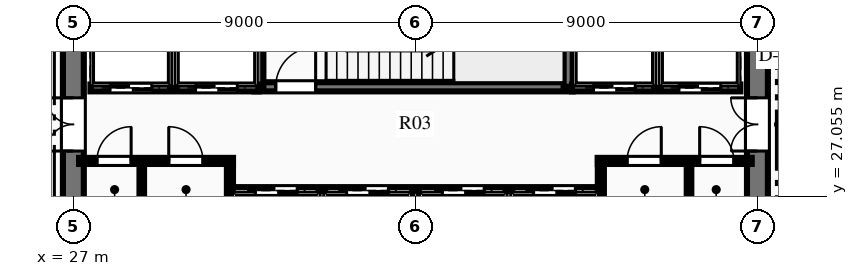
"""IFC4 building model, lengths in metres.
Left out: names, types, materials, properties, quantities, classifications, styles, units other than length and angle.
Written with IfcOpenShell. Run it as: python <this file> out.ifc"""

import sys

from ifc_helpers import new_model, si_unit, direction, frame, frame_2d, origin, place, context, subcontext, project, spatial, rectangle, extrude, element, fill, save


model = new_model("IFC4")
c1 = context("Model", 3, precision=1e-05, world=origin(), true_north=direction((0.0, 1.0)))
c2 = subcontext(c1, "Body", "Model", "MODEL_VIEW")
j1 = project(units=[si_unit("LENGTHUNIT", "METRE"), si_unit("PLANEANGLEUNIT", "RADIAN")], contexts=[c1])
p1 = place(None, origin())
s1 = spatial("IfcSite", under=j1, at=p1, CompositionType="ELEMENT")
p2 = place(p1, origin())
s2 = spatial("IfcBuilding", under=s1, at=p2, CompositionType="ELEMENT")
p3 = place(p2, frame((0.0, 0.0, 131.7)))
s3 = spatial("IfcBuildingStorey", under=s2, at=p3, CompositionType="ELEMENT", Elevation=131.7)
p4 = place(p3, frame((27.0, 18.275, 0.0), z_axis=(0.0, 0.0, 1.0), x_axis=(0.0, 1.0, 0.0)))
e1 = element("IfcWall", 1, at=p4, inside=s3, PredefinedType="SHEAR", context=c2, shape_type="SweptSolid", body=[
    extrude(rectangle(XDim=15.45, YDim=0.55, at=frame_2d((7.725, 0.0))), origin(), (0.0, 0.0, 1.0), 4.5),
])
p5 = place(p4, frame((9.965, 0.0, 0.0)))
e2 = element("IfcOpeningElement", 2, at=p5, cuts=e1, PredefinedType="OPENING", context=c2, shape_type="SweptSolid", body=[
    extrude(rectangle(XDim=1.4, YDim=2.2, at=frame_2d((0.7, 1.1))), frame((0.0, 0.285, 0.0), z_axis=(0.0, -1.0, 0.0), x_axis=(1.0, 0.0, 0.0)), (0.0, 0.0, 1.0), 0.57),
])
p6 = place(p3, frame((45.0, 18.275, 0.0), z_axis=(0.0, 0.0, 1.0), x_axis=(0.0, 1.0, 0.0)))
e3 = element("IfcWall", 3, at=p6, inside=s3, PredefinedType="SHEAR", context=c2, shape_type="SweptSolid", body=[
    extrude(rectangle(XDim=15.45, YDim=0.55, at=frame_2d((7.725, 0.0))), origin(), (0.0, 0.0, 1.0), 4.5),
])
p7 = place(p6, frame((9.965, 0.0, 0.0)))
e4 = element("IfcOpeningElement", 4, at=p7, cuts=e3, PredefinedType="OPENING", context=c2, shape_type="SweptSolid", body=[
    extrude(rectangle(XDim=1.4, YDim=2.2, at=frame_2d((0.7, 1.1))), frame((0.0, 0.285, 0.0), z_axis=(0.0, -1.0, 0.0), x_axis=(1.0, 0.0, 0.0)), (0.0, 0.0, 1.0), 0.57),
])
p8 = place(p3, frame((31.76, 29.93, 0.0), z_axis=(0.0, 0.0, 1.0), x_axis=(1.0, 0.0, 0.0)))
e5 = element("IfcWall", 5, at=p8, inside=s3, PredefinedType="SHEAR", context=c2, shape_type="SweptSolid", body=[
    extrude(rectangle(XDim=8.38, YDim=0.24, at=frame_2d((4.19, 0.0))), origin(), (0.0, 0.0, 1.0), 4.5),
])
p9 = place(p8, frame((0.565, 0.0, 0.0)))
e6 = element("IfcOpeningElement", 6, at=p9, cuts=e5, PredefinedType="OPENING", context=c2, shape_type="SweptSolid", body=[
    extrude(rectangle(XDim=1.05, YDim=2.15, at=frame_2d((0.525, 1.075))), frame((0.0, 0.13, 0.0), z_axis=(0.0, -1.0, 0.0), x_axis=(1.0, 0.0, 0.0)), (0.0, 0.0, 1.0), 0.26),
])
p10 = place(p3, frame((31.88, 29.93, 0.0), z_axis=(0.0, 0.0, 1.0), x_axis=(0.0, 1.0, 0.0)))
e7 = element("IfcWall", 7, at=p10, inside=s3, PredefinedType="SHEAR", context=c2, shape_type="SweptSolid", body=[
    extrude(rectangle(XDim=3.79, YDim=0.24, at=frame_2d((1.895, 0.0))), origin(), (0.0, 0.0, 1.0), 4.5),
])
p11 = place(p3, frame((40.02, 29.93, 0.0), z_axis=(0.0, 0.0, 1.0), x_axis=(0.0, 1.0, 0.0)))
e8 = element("IfcWall", 8, at=p11, inside=s3, PredefinedType="SHEAR", context=c2, shape_type="SweptSolid", body=[
    extrude(rectangle(XDim=3.85, YDim=0.24, at=frame_2d((1.925, 0.0))), origin(), (0.0, 0.0, 1.0), 4.5),
])
p12 = place(p3, frame((27.15, 27.98, 0.0), z_axis=(0.0, 0.0, 1.0), x_axis=(1.0, 0.0, 0.0)))
e9 = element("IfcWall", 9, at=p12, inside=s3, PredefinedType="PARTITIONING", context=c2, shape_type="SweptSolid", body=[
    extrude(rectangle(XDim=4.05, YDim=0.16, at=frame_2d((2.025, 0.0))), origin(), (0.0, 0.0, 1.0), 4.1),
])
p13 = place(p12, frame((0.47, 0.0, 0.0)))
e10 = element("IfcOpeningElement", 10, at=p13, cuts=e9, PredefinedType="OPENING", context=c2, shape_type="SweptSolid", body=[
    extrude(rectangle(XDim=0.9, YDim=2.15, at=frame_2d((0.45, 1.075))), frame((0.0, 0.09, 0.0), z_axis=(0.0, -1.0, 0.0), x_axis=(1.0, 0.0, 0.0)), (0.0, 0.0, 1.0), 0.18),
])
p14 = place(p12, frame((2.36, 0.0, 0.0)))
e11 = element("IfcOpeningElement", 11, at=p14, cuts=e9, PredefinedType="OPENING", context=c2, shape_type="SweptSolid", body=[
    extrude(rectangle(XDim=0.9, YDim=2.15, at=frame_2d((0.45, 1.075))), frame((0.0, 0.09, 0.0), z_axis=(0.0, -1.0, 0.0), x_axis=(1.0, 0.0, 0.0)), (0.0, 0.0, 1.0), 0.18),
])
p15 = place(p3, frame((31.12, 26.54, 0.0), z_axis=(0.0, 0.0, 1.0), x_axis=(0.0, 1.0, 0.0)))
e12 = element("IfcWall", 12, at=p15, inside=s3, PredefinedType="PARTITIONING", context=c2, shape_type="SweptSolid", body=[
    extrude(rectangle(XDim=1.51, YDim=0.16, at=frame_2d((0.755, 0.0))), origin(), (0.0, 0.0, 1.0), 4.1),
])
p16 = place(p3, frame((40.8, 27.98, 0.0), z_axis=(0.0, 0.0, 1.0), x_axis=(1.0, 0.0, 0.0)))
e13 = element("IfcWall", 13, at=p16, inside=s3, PredefinedType="PARTITIONING", context=c2, shape_type="SweptSolid", body=[
    extrude(rectangle(XDim=4.05, YDim=0.16, at=frame_2d((2.025, 0.0))), origin(), (0.0, 0.0, 1.0), 4.1),
])
p17 = place(p16, frame((0.77, 0.0, 0.0)))
e14 = element("IfcOpeningElement", 14, at=p17, cuts=e13, PredefinedType="OPENING", context=c2, shape_type="SweptSolid", body=[
    extrude(rectangle(XDim=0.9, YDim=2.15, at=frame_2d((0.45, 1.075))), frame((0.0, 0.09, 0.0), z_axis=(0.0, -1.0, 0.0), x_axis=(1.0, 0.0, 0.0)), (0.0, 0.0, 1.0), 0.18),
])
p18 = place(p16, frame((2.68, 0.0, 0.0)))
e15 = element("IfcOpeningElement", 15, at=p18, cuts=e13, PredefinedType="OPENING", context=c2, shape_type="SweptSolid", body=[
    extrude(rectangle(XDim=0.9, YDim=2.15, at=frame_2d((0.45, 1.075))), frame((0.0, 0.09, 0.0), z_axis=(0.0, -1.0, 0.0), x_axis=(1.0, 0.0, 0.0)), (0.0, 0.0, 1.0), 0.18),
])
p19 = place(p3, frame((40.88, 26.54, 0.0), z_axis=(0.0, 0.0, 1.0), x_axis=(0.0, 1.0, 0.0)))
e16 = element("IfcWall", 16, at=p19, inside=s3, PredefinedType="PARTITIONING", context=c2, shape_type="SweptSolid", body=[
    extrude(rectangle(XDim=1.51, YDim=0.16, at=frame_2d((0.755, 0.0))), origin(), (0.0, 0.0, 1.0), 4.1),
])
for number, where, z_axis, x_axis in (
    (17, (28.8, 26.54, 0.0), (0.0, 0.0, 1.0), (0.0, 1.0, 0.0)),
    (18, (43.2, 26.54, 0.0), (0.0, 0.0, 1.0), (0.0, 1.0, 0.0)),
):
    element("IfcWall", number, at=place(p3, frame(where, z_axis=z_axis, x_axis=x_axis)), inside=s3, PredefinedType="PARTITIONING", context=c2, shape_type="SweptSolid", body=[
        extrude(rectangle(XDim=1.44, YDim=0.12, at=frame_2d((0.72, 0.0))), origin(), (0.0, 0.0, 1.0), 4.1),
    ])
p20 = place(p3, frame((27.45, 29.9, 0.0), z_axis=(0.0, 0.0, 1.0), x_axis=(1.0, 0.0, 0.0)))
e19 = element("IfcWall", 19, at=p20, inside=s3, PredefinedType="PARTITIONING", context=c2, shape_type="SweptSolid", body=[
    extrude(rectangle(XDim=4.43, YDim=0.18, at=frame_2d((2.215, 0.0))), origin(), (0.0, 0.0, 1.0), 4.1),
])
p21 = place(p20, frame((0.515, 0.0, 0.0)))
e20 = element("IfcOpeningElement", 20, at=p21, cuts=e19, PredefinedType="OPENING", context=c2, shape_type="SweptSolid", body=[
    extrude(rectangle(XDim=1.1, YDim=2.15, at=frame_2d((0.55, 1.075))), frame((0.0, 0.1, 0.0), z_axis=(0.0, -1.0, 0.0), x_axis=(1.0, 0.0, 0.0)), (0.0, 0.0, 1.0), 0.2),
])
p22 = place(p20, frame((2.765, 0.0, 0.0)))
e21 = element("IfcOpeningElement", 21, at=p22, cuts=e19, PredefinedType="OPENING", context=c2, shape_type="SweptSolid", body=[
    extrude(rectangle(XDim=1.1, YDim=2.15, at=frame_2d((0.55, 1.075))), frame((0.0, 0.1, 0.0), z_axis=(0.0, -1.0, 0.0), x_axis=(1.0, 0.0, 0.0)), (0.0, 0.0, 1.0), 0.2),
])
p23 = place(p3, frame((29.63, 29.9, 0.0), z_axis=(0.0, 0.0, 1.0), x_axis=(0.0, 1.0, 0.0)))
e22 = element("IfcWall", 22, at=p23, inside=s3, PredefinedType="PARTITIONING", context=c2, shape_type="SweptSolid", body=[
    extrude(rectangle(XDim=3.75, YDim=0.18, at=frame_2d((1.875, 0.0))), origin(), (0.0, 0.0, 1.0), 4.1),
])
p24 = place(p3, frame((40.12, 29.9, 0.0), z_axis=(0.0, 0.0, 1.0), x_axis=(1.0, 0.0, 0.0)))
e23 = element("IfcWall", 23, at=p24, inside=s3, PredefinedType="PARTITIONING", context=c2, shape_type="SweptSolid", body=[
    extrude(rectangle(XDim=4.43, YDim=0.18, at=frame_2d((2.215, 0.0))), origin(), (0.0, 0.0, 1.0), 4.1),
])
p25 = place(p24, frame((0.565, 0.0, 0.0)))
e24 = element("IfcOpeningElement", 24, at=p25, cuts=e23, PredefinedType="OPENING", context=c2, shape_type="SweptSolid", body=[
    extrude(rectangle(XDim=1.1, YDim=2.15, at=frame_2d((0.55, 1.075))), frame((0.0, 0.1, 0.0), z_axis=(0.0, -1.0, 0.0), x_axis=(1.0, 0.0, 0.0)), (0.0, 0.0, 1.0), 0.2),
])
p26 = place(p24, frame((2.815, 0.0, 0.0)))
e25 = element("IfcOpeningElement", 25, at=p26, cuts=e23, PredefinedType="OPENING", context=c2, shape_type="SweptSolid", body=[
    extrude(rectangle(XDim=1.1, YDim=2.15, at=frame_2d((0.55, 1.075))), frame((0.0, 0.1, 0.0), z_axis=(0.0, -1.0, 0.0), x_axis=(1.0, 0.0, 0.0)), (0.0, 0.0, 1.0), 0.2),
])
p27 = place(p3, frame((42.37, 29.9, 0.0), z_axis=(0.0, 0.0, 1.0), x_axis=(0.0, 1.0, 0.0)))
e26 = element("IfcWall", 26, at=p27, inside=s3, PredefinedType="PARTITIONING", context=c2, shape_type="SweptSolid", body=[
    extrude(rectangle(XDim=3.75, YDim=0.18, at=frame_2d((1.875, 0.0))), origin(), (0.0, 0.0, 1.0), 4.1),
])
p28 = place(p3, frame((31.2, 27.2, 0.0), z_axis=(0.0, 0.0, 1.0), x_axis=(1.0, 0.0, 0.0)))
e27 = element("IfcWall", 27, at=p28, inside=s3, PredefinedType="PARTITIONING", context=c2, shape_type="SweptSolid", body=[
    extrude(rectangle(XDim=9.6, YDim=0.18, at=frame_2d((4.8, 0.0))), origin(), (0.0, 0.0, 1.0), 4.1),
])
p29 = place(p28, frame((0.59, 0.0, 0.0)))
e28 = element("IfcOpeningElement", 28, at=p29, cuts=e27, PredefinedType="OPENING", context=c2, shape_type="SweptSolid", body=[
    extrude(rectangle(XDim=1.1, YDim=2.15, at=frame_2d((0.55, 1.075))), frame((0.0, 0.1, 0.0), z_axis=(0.0, -1.0, 0.0), x_axis=(1.0, 0.0, 0.0)), (0.0, 0.0, 1.0), 0.2),
])
p30 = place(p28, frame((2.99, 0.0, 0.0)))
e29 = element("IfcOpeningElement", 29, at=p30, cuts=e27, PredefinedType="OPENING", context=c2, shape_type="SweptSolid", body=[
    extrude(rectangle(XDim=1.1, YDim=2.15, at=frame_2d((0.55, 1.075))), frame((0.0, 0.1, 0.0), z_axis=(0.0, -1.0, 0.0), x_axis=(1.0, 0.0, 0.0)), (0.0, 0.0, 1.0), 0.2),
])
p31 = place(p28, frame((5.51, 0.0, 0.0)))
e30 = element("IfcOpeningElement", 30, at=p31, cuts=e27, PredefinedType="OPENING", context=c2, shape_type="SweptSolid", body=[
    extrude(rectangle(XDim=1.1, YDim=2.15, at=frame_2d((0.55, 1.075))), frame((0.0, 0.1, 0.0), z_axis=(0.0, -1.0, 0.0), x_axis=(1.0, 0.0, 0.0)), (0.0, 0.0, 1.0), 0.2),
])
p32 = place(p28, frame((7.91, 0.0, 0.0)))
e31 = element("IfcOpeningElement", 31, at=p32, cuts=e27, PredefinedType="OPENING", context=c2, shape_type="SweptSolid", body=[
    extrude(rectangle(XDim=1.1, YDim=2.15, at=frame_2d((0.55, 1.075))), frame((0.0, 0.1, 0.0), z_axis=(0.0, -1.0, 0.0), x_axis=(1.0, 0.0, 0.0)), (0.0, 0.0, 1.0), 0.2),
])
for number, where, z_axis, x_axis in (
    (32, (33.54, 25.3, 0.0), (0.0, 0.0, 1.0), (0.0, 1.0, 0.0)),
    (33, (36.0, 25.3, 0.0), (0.0, 0.0, 1.0), (0.0, 1.0, 0.0)),
    (34, (38.46, 25.3, 0.0), (0.0, 0.0, 1.0), (0.0, 1.0, 0.0)),
):
    element("IfcWall", number, at=place(p3, frame(where, z_axis=z_axis, x_axis=x_axis)), inside=s3, PredefinedType="PARTITIONING", context=c2, shape_type="SweptSolid", body=[
        extrude(rectangle(XDim=1.9, YDim=0.18, at=frame_2d((0.95, 0.0))), origin(), (0.0, 0.0, 1.0), 4.1),
    ])
p33 = place(p13, origin())
e35 = element("IfcDoor", 35, at=p33, inside=s3, OperationType="SINGLE_SWING_RIGHT", PredefinedType="DOOR", context=c2, shape_type="SweptSolid", body=[
    extrude(rectangle(XDim=0.9, YDim=2.15, at=frame_2d((0.45, 1.075))), frame((0.0, 0.025, 0.0), z_axis=(0.0, -1.0, 0.0), x_axis=(1.0, 0.0, 0.0)), (0.0, 0.0, 1.0), 0.05),
])
fill(e10, e35)
p34 = place(p14, origin())
e36 = element("IfcDoor", 36, at=p34, inside=s3, OperationType="SINGLE_SWING_LEFT", PredefinedType="DOOR", context=c2, shape_type="SweptSolid", body=[
    extrude(rectangle(XDim=0.9, YDim=2.15, at=frame_2d((0.45, 1.075))), frame((0.0, 0.025, 0.0), z_axis=(0.0, -1.0, 0.0), x_axis=(1.0, 0.0, 0.0)), (0.0, 0.0, 1.0), 0.05),
])
fill(e11, e36)
p35 = place(p17, origin())
e37 = element("IfcDoor", 37, at=p35, inside=s3, OperationType="SINGLE_SWING_RIGHT", PredefinedType="DOOR", context=c2, shape_type="SweptSolid", body=[
    extrude(rectangle(XDim=0.9, YDim=2.15, at=frame_2d((0.45, 1.075))), frame((0.0, 0.025, 0.0), z_axis=(0.0, -1.0, 0.0), x_axis=(1.0, 0.0, 0.0)), (0.0, 0.0, 1.0), 0.05),
])
fill(e14, e37)
p36 = place(p18, origin())
e38 = element("IfcDoor", 38, at=p36, inside=s3, OperationType="SINGLE_SWING_LEFT", PredefinedType="DOOR", context=c2, shape_type="SweptSolid", body=[
    extrude(rectangle(XDim=0.9, YDim=2.15, at=frame_2d((0.45, 1.075))), frame((0.0, 0.025, 0.0), z_axis=(0.0, -1.0, 0.0), x_axis=(1.0, 0.0, 0.0)), (0.0, 0.0, 1.0), 0.05),
])
fill(e15, e38)
p37 = place(p9, origin())
e39 = element("IfcDoor", 39, at=p37, inside=s3, OperationType="SINGLE_SWING_RIGHT", PredefinedType="DOOR", context=c2, shape_type="SweptSolid", body=[
    extrude(rectangle(XDim=1.05, YDim=2.15, at=frame_2d((0.525, 1.075))), frame((0.0, 0.025, 0.0), z_axis=(0.0, -1.0, 0.0), x_axis=(1.0, 0.0, 0.0)), (0.0, 0.0, 1.0), 0.05),
])
fill(e6, e39)
p38 = place(p5, origin())
e40 = element("IfcDoor", 40, at=p38, inside=s3, OperationType="DOUBLE_DOOR_SINGLE_SWING", PredefinedType="DOOR", context=c2, shape_type="SweptSolid", body=[
    extrude(rectangle(XDim=1.4, YDim=2.2, at=frame_2d((0.7, 1.1))), frame((0.0, 0.025, 0.0), z_axis=(0.0, -1.0, 0.0), x_axis=(1.0, 0.0, 0.0)), (0.0, 0.0, 1.0), 0.05),
])
fill(e2, e40)
p39 = place(p7, origin())
e41 = element("IfcDoor", 41, at=p39, inside=s3, OperationType="DOUBLE_DOOR_SINGLE_SWING", PredefinedType="DOOR", context=c2, shape_type="SweptSolid", body=[
    extrude(rectangle(XDim=1.4, YDim=2.2, at=frame_2d((0.7, 1.1))), frame((0.0, 0.025, 0.0), z_axis=(0.0, -1.0, 0.0), x_axis=(1.0, 0.0, 0.0)), (0.0, 0.0, 1.0), 0.05),
])
fill(e4, e41)
p40 = place(p21, origin())
e42 = element("IfcDoor", 42, at=p40, inside=s3, OperationType="SLIDING_TO_LEFT", PredefinedType="DOOR", context=c2, shape_type="SweptSolid", body=[
    extrude(rectangle(XDim=1.1, YDim=2.15, at=frame_2d((0.55, 1.075))), frame((0.0, 0.025, 0.0), z_axis=(0.0, -1.0, 0.0), x_axis=(1.0, 0.0, 0.0)), (0.0, 0.0, 1.0), 0.05),
])
fill(e20, e42)
p41 = place(p22, origin())
e43 = element("IfcDoor", 43, at=p41, inside=s3, OperationType="SLIDING_TO_LEFT", PredefinedType="DOOR", context=c2, shape_type="SweptSolid", body=[
    extrude(rectangle(XDim=1.1, YDim=2.15, at=frame_2d((0.55, 1.075))), frame((0.0, 0.025, 0.0), z_axis=(0.0, -1.0, 0.0), x_axis=(1.0, 0.0, 0.0)), (0.0, 0.0, 1.0), 0.05),
])
fill(e21, e43)
p42 = place(p25, origin())
e44 = element("IfcDoor", 44, at=p42, inside=s3, OperationType="SLIDING_TO_LEFT", PredefinedType="DOOR", context=c2, shape_type="SweptSolid", body=[
    extrude(rectangle(XDim=1.1, YDim=2.15, at=frame_2d((0.55, 1.075))), frame((0.0, 0.025, 0.0), z_axis=(0.0, -1.0, 0.0), x_axis=(1.0, 0.0, 0.0)), (0.0, 0.0, 1.0), 0.05),
])
fill(e24, e44)
p43 = place(p26, origin())
e45 = element("IfcDoor", 45, at=p43, inside=s3, OperationType="SLIDING_TO_LEFT", PredefinedType="DOOR", context=c2, shape_type="SweptSolid", body=[
    extrude(rectangle(XDim=1.1, YDim=2.15, at=frame_2d((0.55, 1.075))), frame((0.0, 0.025, 0.0), z_axis=(0.0, -1.0, 0.0), x_axis=(1.0, 0.0, 0.0)), (0.0, 0.0, 1.0), 0.05),
])
fill(e25, e45)
p44 = place(p29, origin())
e46 = element("IfcDoor", 46, at=p44, inside=s3, OperationType="SLIDING_TO_LEFT", PredefinedType="DOOR", context=c2, shape_type="SweptSolid", body=[
    extrude(rectangle(XDim=1.1, YDim=2.15, at=frame_2d((0.55, 1.075))), frame((0.0, 0.025, 0.0), z_axis=(0.0, -1.0, 0.0), x_axis=(1.0, 0.0, 0.0)), (0.0, 0.0, 1.0), 0.05),
])
fill(e28, e46)
p45 = place(p30, origin())
e47 = element("IfcDoor", 47, at=p45, inside=s3, OperationType="SLIDING_TO_LEFT", PredefinedType="DOOR", context=c2, shape_type="SweptSolid", body=[
    extrude(rectangle(XDim=1.1, YDim=2.15, at=frame_2d((0.55, 1.075))), frame((0.0, 0.025, 0.0), z_axis=(0.0, -1.0, 0.0), x_axis=(1.0, 0.0, 0.0)), (0.0, 0.0, 1.0), 0.05),
])
fill(e29, e47)
p46 = place(p31, origin())
e48 = element("IfcDoor", 48, at=p46, inside=s3, OperationType="SLIDING_TO_LEFT", PredefinedType="DOOR", context=c2, shape_type="SweptSolid", body=[
    extrude(rectangle(XDim=1.1, YDim=2.15, at=frame_2d((0.55, 1.075))), frame((0.0, 0.025, 0.0), z_axis=(0.0, -1.0, 0.0), x_axis=(1.0, 0.0, 0.0)), (0.0, 0.0, 1.0), 0.05),
])
fill(e30, e48)
p47 = place(p32, origin())
e49 = element("IfcDoor", 49, at=p47, inside=s3, OperationType="SLIDING_TO_LEFT", PredefinedType="DOOR", context=c2, shape_type="SweptSolid", body=[
    extrude(rectangle(XDim=1.1, YDim=2.15, at=frame_2d((0.55, 1.075))), frame((0.0, 0.025, 0.0), z_axis=(0.0, -1.0, 0.0), x_axis=(1.0, 0.0, 0.0)), (0.0, 0.0, 1.0), 0.05),
])
fill(e31, e49)
save(model, sys.argv[1])
